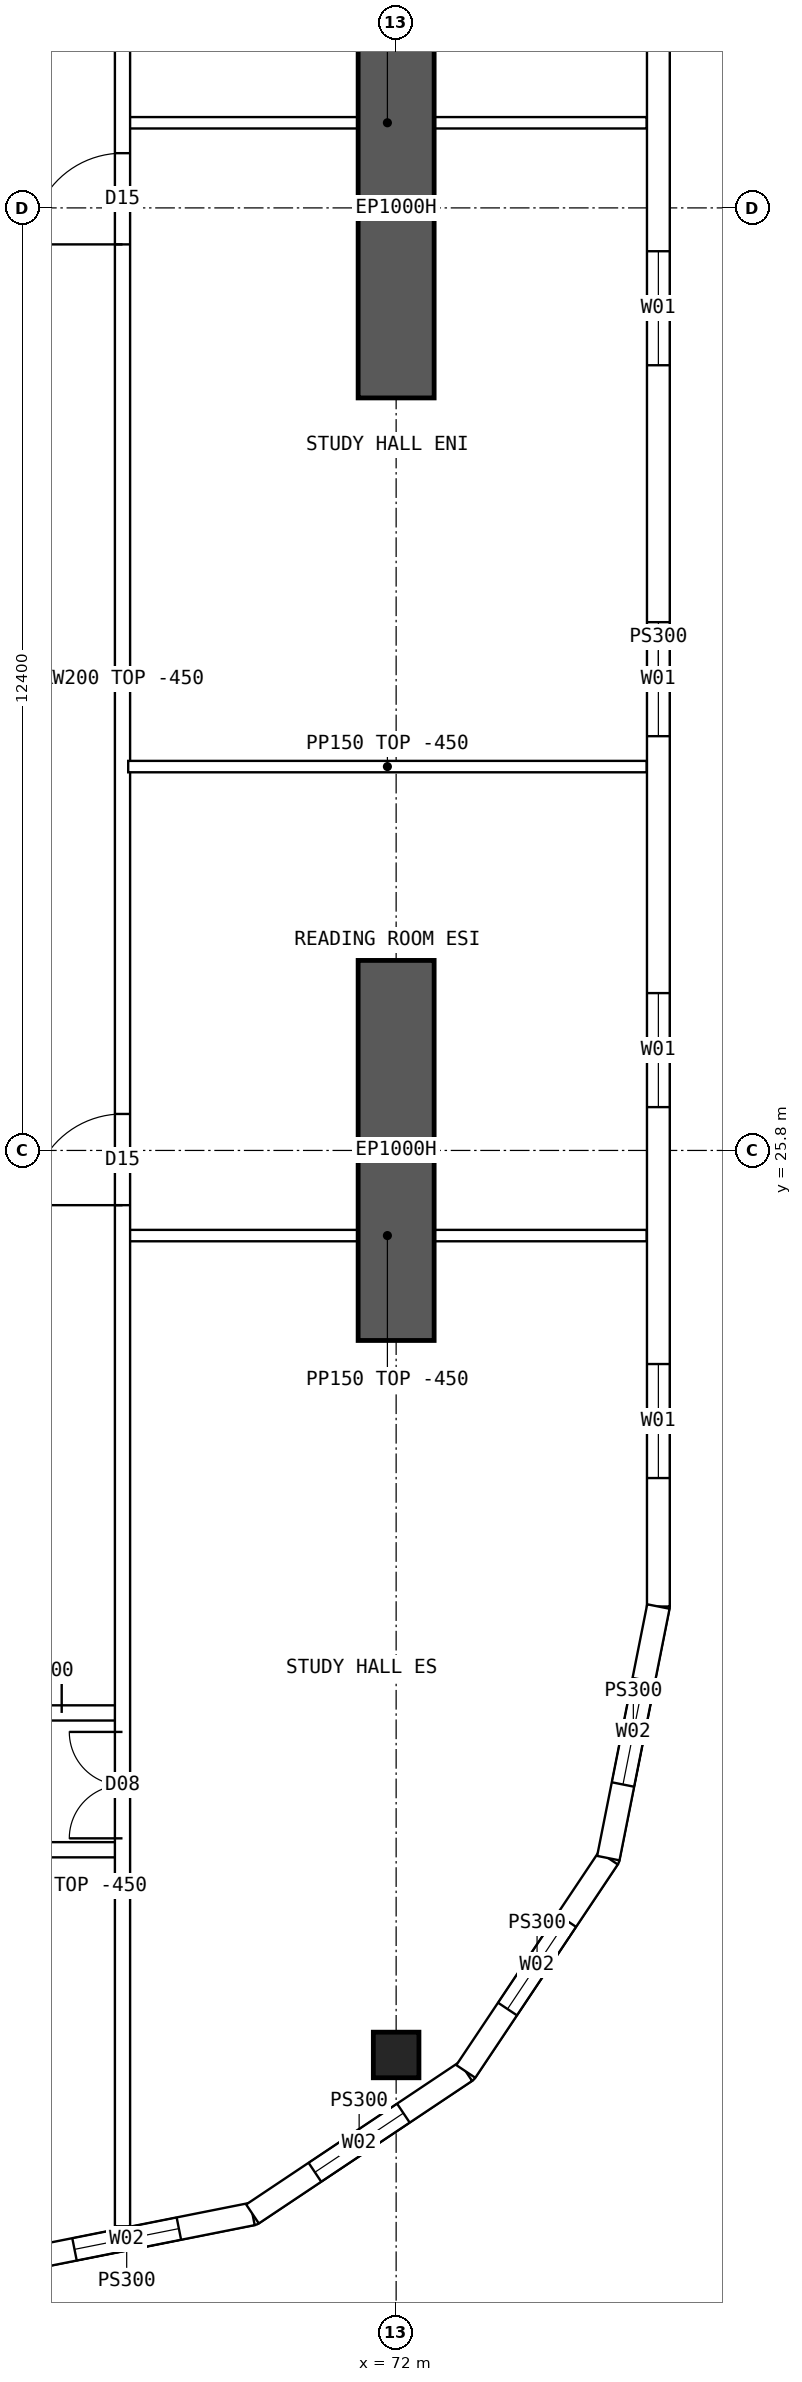
"""IFC4 building model, lengths in metres.
Left out: names, types, materials, properties, quantities, classifications, styles, units other than length and angle.
Written with IfcOpenShell. Run it as: python <this file> out.ifc"""

import sys

from ifc_helpers import new_model, si_unit, direction, frame, frame_2d, origin, origin_2d, place, context, subcontext, project, spatial, polyline, rectangle, hollow_rectangle, outline, extrude, element, fill, save


model = new_model("IFC4")
c1 = context("Model", 3, precision=1e-05, world=origin(), true_north=direction((0.0, 1.0)))
c2 = subcontext(c1, "Body", "Model", "MODEL_VIEW")
j1 = project(units=[si_unit("LENGTHUNIT", "METRE"), si_unit("PLANEANGLEUNIT", "RADIAN")], contexts=[c1])
p1 = place(None, origin())
s1 = spatial("IfcSite", under=j1, at=p1, CompositionType="ELEMENT")
p2 = place(p1, origin())
s2 = spatial("IfcBuilding", under=s1, at=p2, CompositionType="ELEMENT")
p3 = place(p2, frame((0.0, 0.0, 212.8)))
s3 = spatial("IfcBuildingStorey", under=s2, at=p3, CompositionType="ELEMENT", Elevation=212.8)
p4 = place(p3, frame((72.0, 13.9, 0.0), z_axis=(0.0, 0.0, 1.0), x_axis=(1.0, 0.0, 0.0)))
e1 = element("IfcColumn", 1, at=p4, inside=s3, PredefinedType="COLUMN", context=c2, shape_type="SweptSolid", body=[
    extrude(hollow_rectangle(XDim=0.6, YDim=0.6, WallThickness=0.06, at=origin_2d()), origin(), (0.0, 0.0, 1.0), 3.75),
])
for number, where, z_axis, x_axis in (
    (2, (72.0, 23.3, 0.0), (0.0, 0.0, 1.0), (0.0, 1.0, 0.0)),
    (3, (72.0, 35.7, 0.0), (0.0, 0.0, 1.0), (0.0, 1.0, 0.0)),
):
    element("IfcWall", number, at=place(p3, frame(where, z_axis=z_axis, x_axis=x_axis)), inside=s3, PredefinedType="SHEAR", context=c2, shape_type="SweptSolid", body=[
        extrude(rectangle(XDim=5.0, YDim=1.0, at=frame_2d((2.5, 0.0))), origin(), (0.0, 0.0, 1.0), 3.75),
    ])
p5 = place(p3, frame((75.45, 19.8, 0.0), z_axis=(0.0, 0.0, 1.0), x_axis=(0.0, 1.0, 0.0)))
e4 = element("IfcWall", 4, at=p5, inside=s3, PredefinedType="SOLIDWALL", context=c2, shape_type="SweptSolid", body=[
    extrude(outline(polyline([(-0.015, -0.15), (24.415, -0.15), (24.385, 0.15), (0.015, 0.15), (-0.015, -0.15)])), origin(), (0.0, 0.0, 1.0), 3.3),
])
p6 = place(p5, frame((1.69, 0.0, 0.9)))
e5 = element("IfcOpeningElement", 5, at=p6, cuts=e4, PredefinedType="OPENING", context=c2, shape_type="SweptSolid", body=[
    extrude(rectangle(XDim=1.5, YDim=2.0, at=frame_2d((0.75, 1.0))), frame((0.0, 0.16, 0.0), z_axis=(0.0, -1.0, 0.0), x_axis=(1.0, 0.0, 0.0)), (0.0, 0.0, 1.0), 0.32),
])
p7 = place(p5, frame((6.57, 0.0, 0.9)))
e6 = element("IfcOpeningElement", 6, at=p7, cuts=e4, PredefinedType="OPENING", context=c2, shape_type="SweptSolid", body=[
    extrude(rectangle(XDim=1.5, YDim=2.0, at=frame_2d((0.75, 1.0))), frame((0.0, 0.16, 0.0), z_axis=(0.0, -1.0, 0.0), x_axis=(1.0, 0.0, 0.0)), (0.0, 0.0, 1.0), 0.32),
])
p8 = place(p5, frame((11.45, 0.0, 0.9)))
e7 = element("IfcOpeningElement", 7, at=p8, cuts=e4, PredefinedType="OPENING", context=c2, shape_type="SweptSolid", body=[
    extrude(rectangle(XDim=1.5, YDim=2.0, at=frame_2d((0.75, 1.0))), frame((0.0, 0.16, 0.0), z_axis=(0.0, -1.0, 0.0), x_axis=(1.0, 0.0, 0.0)), (0.0, 0.0, 1.0), 0.32),
])
p9 = place(p5, frame((16.33, 0.0, 0.9)))
e8 = element("IfcOpeningElement", 8, at=p9, cuts=e4, PredefinedType="OPENING", context=c2, shape_type="SweptSolid", body=[
    extrude(rectangle(XDim=1.5, YDim=2.0, at=frame_2d((0.75, 1.0))), frame((0.0, 0.16, 0.0), z_axis=(0.0, -1.0, 0.0), x_axis=(1.0, 0.0, 0.0)), (0.0, 0.0, 1.0), 0.32),
])
p10 = place(p5, frame((21.21, 0.0, 0.9)))
e9 = element("IfcOpeningElement", 9, at=p10, cuts=e4, PredefinedType="OPENING", context=c2, shape_type="SweptSolid", body=[
    extrude(rectangle(XDim=1.5, YDim=2.0, at=frame_2d((0.75, 1.0))), frame((0.0, 0.16, 0.0), z_axis=(0.0, -1.0, 0.0), x_axis=(1.0, 0.0, 0.0)), (0.0, 0.0, 1.0), 0.32),
])
p11 = place(p3, frame((66.8, 11.15, 0.0), z_axis=(0.0, 0.0, 1.0), x_axis=(0.98078325777, 0.195100490205, 0.0)))
e10 = element("IfcWall", 10, at=p11, inside=s3, PredefinedType="SOLIDWALL", context=c2, shape_type="SweptSolid", body=[
    extrude(outline(polyline([(-0.03, -0.15), (3.405, -0.15), (3.345, 0.15), (0.03, 0.15), (-0.03, -0.15)])), origin(), (0.0, 0.0, 1.0), 3.3),
])
p12 = place(p11, frame((0.988, 0.0, 0.9)))
e11 = element("IfcOpeningElement", 11, at=p12, cuts=e10, PredefinedType="OPENING", context=c2, shape_type="SweptSolid", body=[
    extrude(rectangle(XDim=1.4, YDim=1.8, at=frame_2d((0.7, 0.9))), frame((0.0, 0.16, 0.0), z_axis=(0.0, -1.0, 0.0), x_axis=(1.0, 0.0, 0.0)), (0.0, 0.0, 1.0), 0.32),
])
p13 = place(p3, frame((70.11, 11.808, 0.0), z_axis=(0.0, 0.0, 1.0), x_axis=(0.831460037396, 0.555584562613, 0.0)))
e12 = element("IfcWall", 12, at=p13, inside=s3, PredefinedType="SOLIDWALL", context=c2, shape_type="SweptSolid", body=[
    extrude(outline(polyline([(-0.03, -0.15), (3.405, -0.15), (3.345, 0.15), (0.03, 0.15), (-0.03, -0.15)])), origin(), (0.0, 0.0, 1.0), 3.3),
])
p14 = place(p13, frame((0.988, 0.0, 0.9)))
e13 = element("IfcOpeningElement", 13, at=p14, cuts=e12, PredefinedType="OPENING", context=c2, shape_type="SweptSolid", body=[
    extrude(rectangle(XDim=1.4, YDim=1.8, at=frame_2d((0.7, 0.9))), frame((0.0, 0.16, 0.0), z_axis=(0.0, -1.0, 0.0), x_axis=(1.0, 0.0, 0.0)), (0.0, 0.0, 1.0), 0.32),
])
p15 = place(p3, frame((72.917, 13.684, 0.0), z_axis=(0.0, 0.0, 1.0), x_axis=(0.555567969291, 0.831471124873, 0.0)))
e14 = element("IfcWall", 14, at=p15, inside=s3, PredefinedType="SOLIDWALL", context=c2, shape_type="SweptSolid", body=[
    extrude(outline(polyline([(-0.03, -0.15), (3.405, -0.15), (3.345, 0.15), (0.03, 0.15), (-0.03, -0.15)])), origin(), (0.0, 0.0, 1.0), 3.3),
])
p16 = place(p15, frame((0.988, 0.0, 0.9)))
e15 = element("IfcOpeningElement", 15, at=p16, cuts=e14, PredefinedType="OPENING", context=c2, shape_type="SweptSolid", body=[
    extrude(rectangle(XDim=1.4, YDim=1.8, at=frame_2d((0.7, 0.9))), frame((0.0, 0.16, 0.0), z_axis=(0.0, -1.0, 0.0), x_axis=(1.0, 0.0, 0.0)), (0.0, 0.0, 1.0), 0.32),
])
p17 = place(p3, frame((74.792, 16.49, 0.0), z_axis=(0.0, 0.0, 1.0), x_axis=(0.19508664885, 0.980786011034, 0.0)))
e16 = element("IfcWall", 16, at=p17, inside=s3, PredefinedType="SOLIDWALL", context=c2, shape_type="SweptSolid", body=[
    extrude(outline(polyline([(-0.03, -0.15), (3.39, -0.15), (3.36, 0.15), (0.03, 0.15), (-0.03, -0.15)])), origin(), (0.0, 0.0, 1.0), 3.3),
])
p18 = place(p17, frame((0.988, 0.0, 0.9)))
e17 = element("IfcOpeningElement", 17, at=p18, cuts=e16, PredefinedType="OPENING", context=c2, shape_type="SweptSolid", body=[
    extrude(rectangle(XDim=1.4, YDim=1.8, at=frame_2d((0.7, 0.9))), frame((0.0, 0.16, 0.0), z_axis=(0.0, -1.0, 0.0), x_axis=(1.0, 0.0, 0.0)), (0.0, 0.0, 1.0), 0.32),
])
p19 = place(p3, frame((66.35, 16.6, 0.0), z_axis=(0.0, 0.0, 1.0), x_axis=(1.0, 0.0, 0.0)))
e18 = element("IfcWall", 18, at=p19, inside=s3, PredefinedType="SOLIDWALL", context=c2, shape_type="SweptSolid", body=[
    extrude(rectangle(XDim=2.05, YDim=0.2, at=frame_2d((1.025, 0.0))), origin(), (0.0, 0.0, 1.0), 3.3),
])
p20 = place(p19, frame((0.2, 0.0, 0.0)))
e19 = element("IfcOpeningElement", 19, at=p20, cuts=e18, PredefinedType="OPENING", context=c2, shape_type="SweptSolid", body=[
    extrude(rectangle(XDim=0.9, YDim=2.1, at=frame_2d((0.45, 1.05))), frame((0.0, 0.11, 0.0), z_axis=(0.0, -1.0, 0.0), x_axis=(1.0, 0.0, 0.0)), (0.0, 0.0, 1.0), 0.22),
])
p21 = place(p3, frame((66.35, 18.4, 0.0), z_axis=(0.0, 0.0, 1.0), x_axis=(1.0, 0.0, 0.0)))
e20 = element("IfcWall", 20, at=p21, inside=s3, PredefinedType="SOLIDWALL", context=c2, shape_type="SweptSolid", body=[
    extrude(rectangle(XDim=2.05, YDim=0.2, at=frame_2d((1.025, 0.0))), origin(), (0.0, 0.0, 1.0), 3.3),
])
p22 = place(p21, frame((0.05, 0.0, 0.0)))
e21 = element("IfcOpeningElement", 21, at=p22, cuts=e20, PredefinedType="OPENING", context=c2, shape_type="SweptSolid", body=[
    extrude(rectangle(XDim=1.2, YDim=2.1, at=frame_2d((0.6, 1.05))), frame((0.0, 0.11, 0.0), z_axis=(0.0, -1.0, 0.0), x_axis=(1.0, 0.0, 0.0)), (0.0, 0.0, 1.0), 0.22),
])
p23 = place(p3, frame((68.475, 30.85, 0.0), z_axis=(0.0, 0.0, 1.0), x_axis=(1.0, 0.0, 0.0)))
e22 = element("IfcWall", 22, at=p23, inside=s3, PredefinedType="PARTITIONING", context=c2, shape_type="SweptSolid", body=[
    extrude(outline(polyline([(0.0, 0.0), (6.82, 0.0), (6.82, 3.3), (3.827, 3.3), (3.825, 2.85), (3.227, 2.85), (3.225, 3.3), (0.0, 3.3), (0.0, 0.0)])), frame((0.0, 0.075, 0.0), z_axis=(0.0, -1.0, 0.0), x_axis=(1.0, 0.0, 0.0)), (0.0, 0.0, 1.0), 0.15),
])
p24 = place(p3, frame((68.4, 11.646, 0.0), z_axis=(0.0, 0.0, 1.0), x_axis=(0.0, 1.0, 0.0)))
e23 = element("IfcWall", 23, at=p24, inside=s3, PredefinedType="SOLIDWALL", context=c2, shape_type="SweptSolid", body=[
    extrude(rectangle(XDim=40.708, YDim=0.2, at=frame_2d((20.354, 0.0))), origin(), (0.0, 0.0, 1.0), 3.3),
])
p25 = place(p24, frame((13.434, 0.0, 0.0)))
e24 = element("IfcOpeningElement", 24, at=p25, cuts=e23, PredefinedType="OPENING", context=c2, shape_type="SweptSolid", body=[
    extrude(rectangle(XDim=1.2, YDim=2.1, at=frame_2d((0.6, 1.05))), frame((0.0, 0.11, 0.0), z_axis=(0.0, -1.0, 0.0), x_axis=(1.0, 0.0, 0.0)), (0.0, 0.0, 1.0), 0.22),
])
p26 = place(p24, frame((26.074, 0.0, 0.0)))
e25 = element("IfcOpeningElement", 25, at=p26, cuts=e23, PredefinedType="OPENING", context=c2, shape_type="SweptSolid", body=[
    extrude(rectangle(XDim=1.2, YDim=2.1, at=frame_2d((0.6, 1.05))), frame((0.0, 0.11, 0.0), z_axis=(0.0, -1.0, 0.0), x_axis=(1.0, 0.0, 0.0)), (0.0, 0.0, 1.0), 0.22),
])
p27 = place(p24, frame((5.104, 0.0, 0.0)))
e26 = element("IfcOpeningElement", 26, at=p27, cuts=e23, PredefinedType="OPENING", context=c2, shape_type="SweptSolid", body=[
    extrude(rectangle(XDim=1.4, YDim=2.1, at=frame_2d((0.7, 1.05))), frame((0.0, 0.11, 0.0), z_axis=(0.0, -1.0, 0.0), x_axis=(1.0, 0.0, 0.0)), (0.0, 0.0, 1.0), 0.22),
])
p28 = place(p24, frame((34.104, 0.0, 0.0)))
e27 = element("IfcOpeningElement", 27, at=p28, cuts=e23, PredefinedType="OPENING", context=c2, shape_type="SweptSolid", body=[
    extrude(rectangle(XDim=1.4, YDim=2.1, at=frame_2d((0.7, 1.05))), frame((0.0, 0.11, 0.0), z_axis=(0.0, -1.0, 0.0), x_axis=(1.0, 0.0, 0.0)), (0.0, 0.0, 1.0), 0.22),
])
for number, where, z_axis, x_axis in (
    (28, (68.475, 24.68, 0.0), (0.0, 0.0, 1.0), (1.0, 0.0, 0.0)),
    (29, (68.475, 39.32, 0.0), (0.0, 0.0, 1.0), (1.0, 0.0, 0.0)),
):
    element("IfcWall", number, at=place(p3, frame(where, z_axis=z_axis, x_axis=x_axis)), inside=s3, PredefinedType="PARTITIONING", context=c2, shape_type="SweptSolid", body=[
        extrude(rectangle(XDim=6.82, YDim=0.15, at=frame_2d((3.41, 0.0))), origin(), (0.0, 0.0, 1.0), 3.3),
    ])
p29 = place(p6, origin())
e30 = element("IfcWindow", 30, at=p29, inside=s3, PartitioningType="SINGLE_PANEL", PredefinedType="WINDOW", context=c2, shape_type="SweptSolid", body=[
    extrude(rectangle(XDim=1.5, YDim=2.0, at=frame_2d((0.75, 1.0))), frame((0.0, 0.03, 0.0), z_axis=(0.0, -1.0, 0.0), x_axis=(1.0, 0.0, 0.0)), (0.0, 0.0, 1.0), 0.06),
])
fill(e5, e30)
p30 = place(p7, origin())
e31 = element("IfcWindow", 31, at=p30, inside=s3, PartitioningType="SINGLE_PANEL", PredefinedType="WINDOW", context=c2, shape_type="SweptSolid", body=[
    extrude(rectangle(XDim=1.5, YDim=2.0, at=frame_2d((0.75, 1.0))), frame((0.0, 0.03, 0.0), z_axis=(0.0, -1.0, 0.0), x_axis=(1.0, 0.0, 0.0)), (0.0, 0.0, 1.0), 0.06),
])
fill(e6, e31)
p31 = place(p8, origin())
e32 = element("IfcWindow", 32, at=p31, inside=s3, PartitioningType="SINGLE_PANEL", PredefinedType="WINDOW", context=c2, shape_type="SweptSolid", body=[
    extrude(rectangle(XDim=1.5, YDim=2.0, at=frame_2d((0.75, 1.0))), frame((0.0, 0.03, 0.0), z_axis=(0.0, -1.0, 0.0), x_axis=(1.0, 0.0, 0.0)), (0.0, 0.0, 1.0), 0.06),
])
fill(e7, e32)
p32 = place(p9, origin())
e33 = element("IfcWindow", 33, at=p32, inside=s3, PartitioningType="SINGLE_PANEL", PredefinedType="WINDOW", context=c2, shape_type="SweptSolid", body=[
    extrude(rectangle(XDim=1.5, YDim=2.0, at=frame_2d((0.75, 1.0))), frame((0.0, 0.03, 0.0), z_axis=(0.0, -1.0, 0.0), x_axis=(1.0, 0.0, 0.0)), (0.0, 0.0, 1.0), 0.06),
])
fill(e8, e33)
p33 = place(p12, origin())
e34 = element("IfcWindow", 34, at=p33, inside=s3, PartitioningType="SINGLE_PANEL", PredefinedType="WINDOW", context=c2, shape_type="SweptSolid", body=[
    extrude(rectangle(XDim=1.4, YDim=1.8, at=frame_2d((0.7, 0.9))), frame((0.0, 0.03, 0.0), z_axis=(0.0, -1.0, 0.0), x_axis=(1.0, 0.0, 0.0)), (0.0, 0.0, 1.0), 0.06),
])
fill(e11, e34)
p34 = place(p14, origin())
e35 = element("IfcWindow", 35, at=p34, inside=s3, PartitioningType="SINGLE_PANEL", PredefinedType="WINDOW", context=c2, shape_type="SweptSolid", body=[
    extrude(rectangle(XDim=1.4, YDim=1.8, at=frame_2d((0.7, 0.9))), frame((0.0, 0.03, 0.0), z_axis=(0.0, -1.0, 0.0), x_axis=(1.0, 0.0, 0.0)), (0.0, 0.0, 1.0), 0.06),
])
fill(e13, e35)
p35 = place(p16, origin())
e36 = element("IfcWindow", 36, at=p35, inside=s3, PartitioningType="SINGLE_PANEL", PredefinedType="WINDOW", context=c2, shape_type="SweptSolid", body=[
    extrude(rectangle(XDim=1.4, YDim=1.8, at=frame_2d((0.7, 0.9))), frame((0.0, 0.03, 0.0), z_axis=(0.0, -1.0, 0.0), x_axis=(1.0, 0.0, 0.0)), (0.0, 0.0, 1.0), 0.06),
])
fill(e15, e36)
p36 = place(p18, origin())
e37 = element("IfcWindow", 37, at=p36, inside=s3, PartitioningType="SINGLE_PANEL", PredefinedType="WINDOW", context=c2, shape_type="SweptSolid", body=[
    extrude(rectangle(XDim=1.4, YDim=1.8, at=frame_2d((0.7, 0.9))), frame((0.0, 0.03, 0.0), z_axis=(0.0, -1.0, 0.0), x_axis=(1.0, 0.0, 0.0)), (0.0, 0.0, 1.0), 0.06),
])
fill(e17, e37)
p37 = place(p22, origin())
e38 = element("IfcDoor", 38, at=p37, inside=s3, OperationType="DOUBLE_DOOR_SINGLE_SWING", PredefinedType="DOOR", context=c2, shape_type="SweptSolid", body=[
    extrude(rectangle(XDim=1.2, YDim=2.1, at=frame_2d((0.6, 1.05))), frame((0.0, 0.025, 0.0), z_axis=(0.0, -1.0, 0.0), x_axis=(1.0, 0.0, 0.0)), (0.0, 0.0, 1.0), 0.05),
])
fill(e21, e38)
p38 = place(p25, origin())
e39 = element("IfcDoor", 39, at=p38, inside=s3, OperationType="SINGLE_SWING_LEFT", PredefinedType="DOOR", context=c2, shape_type="SweptSolid", body=[
    extrude(rectangle(XDim=1.2, YDim=2.1, at=frame_2d((0.6, 1.05))), frame((0.0, 0.025, 0.0), z_axis=(0.0, -1.0, 0.0), x_axis=(1.0, 0.0, 0.0)), (0.0, 0.0, 1.0), 0.05),
])
fill(e24, e39)
p39 = place(p26, origin())
e40 = element("IfcDoor", 40, at=p39, inside=s3, OperationType="SINGLE_SWING_LEFT", PredefinedType="DOOR", context=c2, shape_type="SweptSolid", body=[
    extrude(rectangle(XDim=1.2, YDim=2.1, at=frame_2d((0.6, 1.05))), frame((0.0, 0.025, 0.0), z_axis=(0.0, -1.0, 0.0), x_axis=(1.0, 0.0, 0.0)), (0.0, 0.0, 1.0), 0.05),
])
fill(e25, e40)
p40 = place(p27, origin())
e41 = element("IfcDoor", 41, at=p40, inside=s3, OperationType="DOUBLE_DOOR_SINGLE_SWING", PredefinedType="DOOR", context=c2, shape_type="SweptSolid", body=[
    extrude(rectangle(XDim=1.4, YDim=2.1, at=frame_2d((0.7, 1.05))), frame((0.0, 0.025, 0.0), z_axis=(0.0, -1.0, 0.0), x_axis=(1.0, 0.0, 0.0)), (0.0, 0.0, 1.0), 0.05),
])
fill(e26, e41)
save(model, sys.argv[1])
